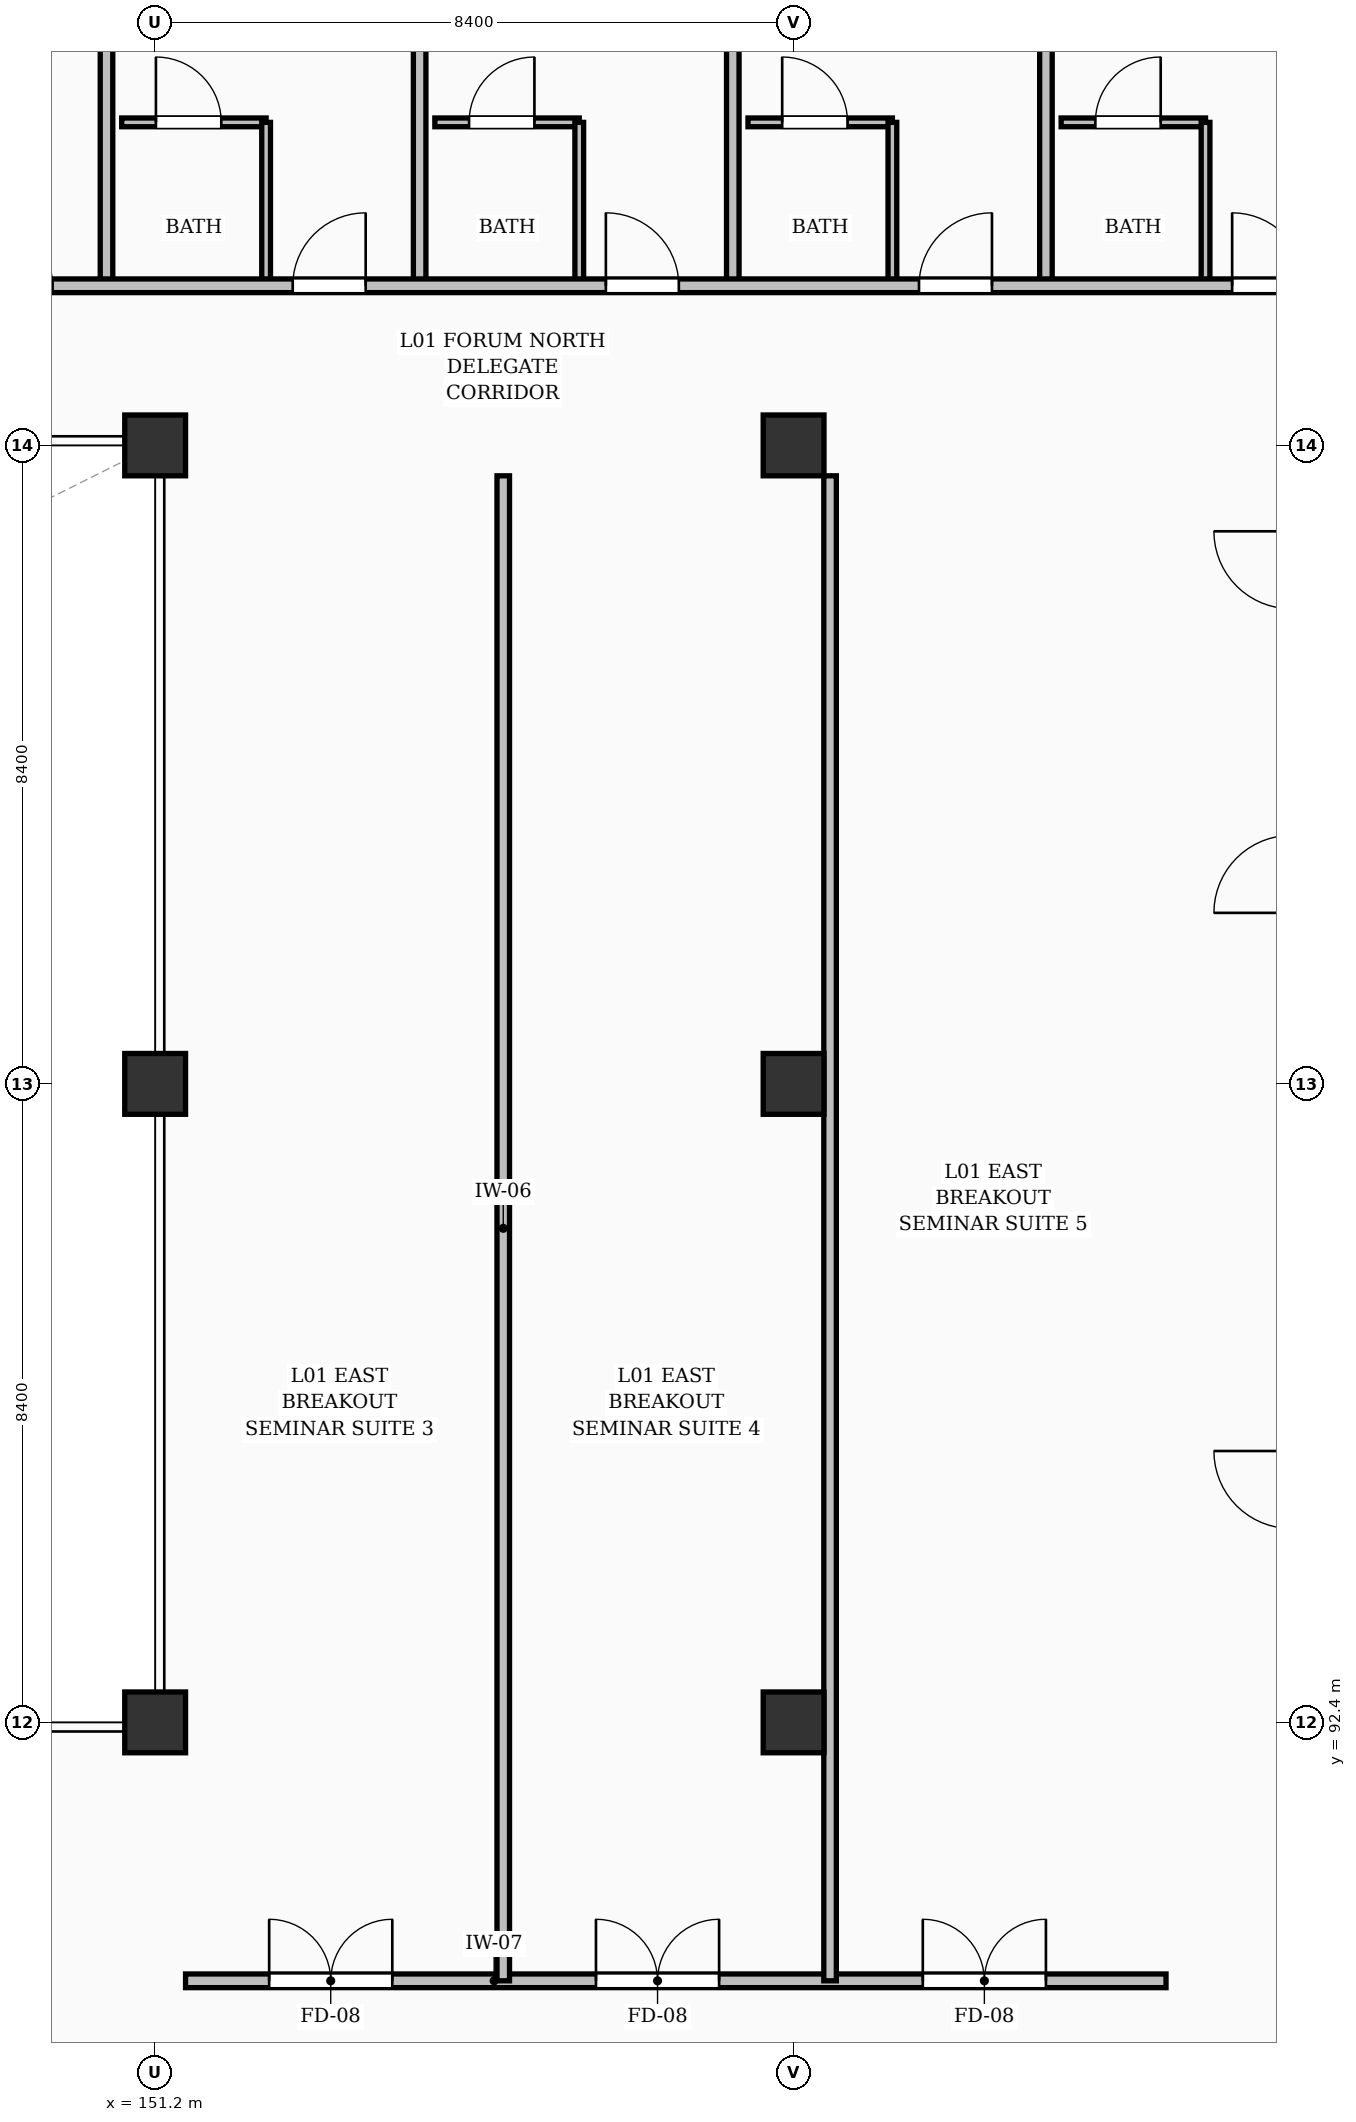
"""IFC4 building model, lengths in metres.
Left out: names, types, materials, properties, quantities, classifications, styles, units other than length and angle.
Written with IfcOpenShell. Run it as: python <this file> out.ifc"""

import sys

from ifc_helpers import new_model, si_unit, direction, frame, frame_2d, origin, origin_2d, place, context, subcontext, project, spatial, rectangle, extrude, element, fill, save


model = new_model("IFC4")
c1 = context("Model", 3, precision=1e-05, world=origin(), true_north=direction((0.0, 1.0)))
c2 = subcontext(c1, "Body", "Model", "MODEL_VIEW")
j1 = project(units=[si_unit("LENGTHUNIT", "METRE"), si_unit("PLANEANGLEUNIT", "RADIAN")], contexts=[c1])
p1 = place(None, origin())
s1 = spatial("IfcSite", under=j1, at=p1, CompositionType="ELEMENT")
p2 = place(p1, origin())
s2 = spatial("IfcBuilding", under=s1, at=p2, CompositionType="ELEMENT")
p3 = place(p2, frame((0.0, 0.0, 3.92)))
s3 = spatial("IfcBuildingStorey", under=s2, at=p3, CompositionType="ELEMENT", Elevation=3.92)
for number, where, z_axis, x_axis in (
    (1, (151.2, 92.4, 0.0), (0.0, 0.0, 1.0), (1.0, 0.0, 0.0)),
    (2, (151.2, 100.8, 0.0), (0.0, 0.0, 1.0), (1.0, 0.0, 0.0)),
    (3, (151.2, 109.2, 0.0), (0.0, 0.0, 1.0), (1.0, 0.0, 0.0)),
    (4, (159.6, 92.4, 0.0), (0.0, 0.0, 1.0), (1.0, 0.0, 0.0)),
    (5, (159.6, 100.8, 0.0), (0.0, 0.0, 1.0), (1.0, 0.0, 0.0)),
    (6, (159.6, 109.2, 0.0), (0.0, 0.0, 1.0), (1.0, 0.0, 0.0)),
):
    element("IfcColumn", number, at=place(p3, frame(where, z_axis=z_axis, x_axis=x_axis)), inside=s3, PredefinedType="COLUMN", context=c2, shape_type="SweptSolid", body=[
        extrude(rectangle(XDim=0.8, YDim=0.8, at=origin_2d()), origin(), (0.0, 0.0, 1.0), 3.64),
    ])
p4 = place(p3, frame((151.6, 89.0, 0.0), z_axis=(0.0, 0.0, 1.0), x_axis=(1.0, 0.0, 0.0)))
e7 = element("IfcWall", 7, at=p4, inside=s3, PredefinedType="PARTITIONING", context=c2, shape_type="SweptSolid", body=[
    extrude(rectangle(XDim=12.9, YDim=0.18, at=frame_2d((6.45, 0.0))), origin(), (0.0, 0.0, 1.0), 3.36),
])
p5 = place(p4, frame((1.1, 0.0, 0.0)))
e8 = element("IfcOpeningElement", 8, at=p5, cuts=e7, PredefinedType="OPENING", context=c2, shape_type="SweptSolid", body=[
    extrude(rectangle(XDim=1.62, YDim=2.2, at=frame_2d((0.81, 1.1))), frame((0.0, 0.1, 0.0), z_axis=(0.0, -1.0, 0.0), x_axis=(1.0, 0.0, 0.0)), (0.0, 0.0, 1.0), 0.2),
])
p6 = place(p4, frame((5.4, 0.0, 0.0)))
e9 = element("IfcOpeningElement", 9, at=p6, cuts=e7, PredefinedType="OPENING", context=c2, shape_type="SweptSolid", body=[
    extrude(rectangle(XDim=1.62, YDim=2.2, at=frame_2d((0.81, 1.1))), frame((0.0, 0.1, 0.0), z_axis=(0.0, -1.0, 0.0), x_axis=(1.0, 0.0, 0.0)), (0.0, 0.0, 1.0), 0.2),
])
p7 = place(p4, frame((9.7, 0.0, 0.0)))
e10 = element("IfcOpeningElement", 10, at=p7, cuts=e7, PredefinedType="OPENING", context=c2, shape_type="SweptSolid", body=[
    extrude(rectangle(XDim=1.62, YDim=2.2, at=frame_2d((0.81, 1.1))), frame((0.0, 0.1, 0.0), z_axis=(0.0, -1.0, 0.0), x_axis=(1.0, 0.0, 0.0)), (0.0, 0.0, 1.0), 0.2),
])
for number, where, z_axis, x_axis in (
    (11, (155.78, 89.0, 0.0), (0.0, 0.0, 1.0), (0.0, 1.0, 0.0)),
    (12, (160.08, 89.0, 0.0), (0.0, 0.0, 1.0), (0.0, 1.0, 0.0)),
):
    element("IfcWall", number, at=place(p3, frame(where, z_axis=z_axis, x_axis=x_axis)), inside=s3, PredefinedType="PARTITIONING", context=c2, shape_type="SweptSolid", body=[
        extrude(rectangle(XDim=19.8, YDim=0.165, at=frame_2d((9.9, 0.0))), origin(), (0.0, 0.0, 1.0), 3.36),
    ])
p8 = place(p3, frame((150.76, 113.45, 0.0), z_axis=(0.0, 0.0, 1.0), x_axis=(1.0, 0.0, 0.0)))
e13 = element("IfcWall", 13, at=p8, inside=s3, PredefinedType="PARTITIONING", context=c2, shape_type="SweptSolid", body=[
    extrude(rectangle(XDim=1.9, YDim=0.115, at=frame_2d((0.95, 0.0))), origin(), (0.0, 0.0, 1.0), 3.36),
])
p9 = place(p8, frame((0.45, 0.0, 0.0)))
e14 = element("IfcOpeningElement", 14, at=p9, cuts=e13, PredefinedType="OPENING", context=c2, shape_type="SweptSolid", body=[
    extrude(rectangle(XDim=0.86, YDim=2.05, at=frame_2d((0.43, 1.025))), frame((0.0, 0.067, 0.0), z_axis=(0.0, -1.0, 0.0), x_axis=(1.0, 0.0, 0.0)), (0.0, 0.0, 1.0), 0.135),
])
p10 = place(p3, frame((152.66, 111.3, 0.0), z_axis=(0.0, 0.0, 1.0), x_axis=(0.0, 1.0, 0.0)))
e15 = element("IfcWall", 15, at=p10, inside=s3, PredefinedType="PARTITIONING", context=c2, shape_type="SweptSolid", body=[
    extrude(rectangle(XDim=2.15, YDim=0.115, at=frame_2d((1.075, 0.0))), origin(), (0.0, 0.0, 1.0), 3.36),
])
p11 = place(p3, frame((150.56, 111.3, 0.0), z_axis=(0.0, 0.0, 1.0), x_axis=(0.0, 1.0, 0.0)))
e16 = element("IfcWall", 16, at=p11, inside=s3, PredefinedType="PARTITIONING", context=c2, shape_type="SweptSolid", body=[
    extrude(rectangle(XDim=6.16, YDim=0.165, at=frame_2d((3.08, 0.0))), origin(), (0.0, 0.0, 1.0), 3.36),
])
p12 = place(p3, frame((154.88, 113.45, 0.0), z_axis=(0.0, 0.0, 1.0), x_axis=(1.0, 0.0, 0.0)))
e17 = element("IfcWall", 17, at=p12, inside=s3, PredefinedType="PARTITIONING", context=c2, shape_type="SweptSolid", body=[
    extrude(rectangle(XDim=1.9, YDim=0.115, at=frame_2d((0.95, 0.0))), origin(), (0.0, 0.0, 1.0), 3.36),
])
p13 = place(p12, frame((0.45, 0.0, 0.0)))
e18 = element("IfcOpeningElement", 18, at=p13, cuts=e17, PredefinedType="OPENING", context=c2, shape_type="SweptSolid", body=[
    extrude(rectangle(XDim=0.86, YDim=2.05, at=frame_2d((0.43, 1.025))), frame((0.0, 0.067, 0.0), z_axis=(0.0, -1.0, 0.0), x_axis=(1.0, 0.0, 0.0)), (0.0, 0.0, 1.0), 0.135),
])
p14 = place(p3, frame((156.78, 111.3, 0.0), z_axis=(0.0, 0.0, 1.0), x_axis=(0.0, 1.0, 0.0)))
e19 = element("IfcWall", 19, at=p14, inside=s3, PredefinedType="PARTITIONING", context=c2, shape_type="SweptSolid", body=[
    extrude(rectangle(XDim=2.15, YDim=0.115, at=frame_2d((1.075, 0.0))), origin(), (0.0, 0.0, 1.0), 3.042),
])
p15 = place(p3, frame((154.68, 111.3, 0.0), z_axis=(0.0, 0.0, 1.0), x_axis=(0.0, 1.0, 0.0)))
e20 = element("IfcWall", 20, at=p15, inside=s3, PredefinedType="PARTITIONING", context=c2, shape_type="SweptSolid", body=[
    extrude(rectangle(XDim=6.15, YDim=0.165, at=frame_2d((3.075, 0.0))), origin(), (0.0, 0.0, 1.0), 3.36),
])
p16 = place(p3, frame((159.0, 113.45, 0.0), z_axis=(0.0, 0.0, 1.0), x_axis=(1.0, 0.0, 0.0)))
e21 = element("IfcWall", 21, at=p16, inside=s3, PredefinedType="PARTITIONING", context=c2, shape_type="SweptSolid", body=[
    extrude(rectangle(XDim=1.9, YDim=0.115, at=frame_2d((0.95, 0.0))), origin(), (0.0, 0.0, 1.0), 3.36),
])
p17 = place(p16, frame((0.45, 0.0, 0.0)))
e22 = element("IfcOpeningElement", 22, at=p17, cuts=e21, PredefinedType="OPENING", context=c2, shape_type="SweptSolid", body=[
    extrude(rectangle(XDim=0.86, YDim=2.05, at=frame_2d((0.43, 1.025))), frame((0.0, 0.067, 0.0), z_axis=(0.0, -1.0, 0.0), x_axis=(1.0, 0.0, 0.0)), (0.0, 0.0, 1.0), 0.135),
])
p18 = place(p3, frame((160.9, 111.3, 0.0), z_axis=(0.0, 0.0, 1.0), x_axis=(0.0, 1.0, 0.0)))
e23 = element("IfcWall", 23, at=p18, inside=s3, PredefinedType="PARTITIONING", context=c2, shape_type="SweptSolid", body=[
    extrude(rectangle(XDim=2.15, YDim=0.115, at=frame_2d((1.075, 0.0))), origin(), (0.0, 0.0, 1.0), 3.36),
])
p19 = place(p3, frame((158.8, 111.3, 0.0), z_axis=(0.0, 0.0, 1.0), x_axis=(0.0, 1.0, 0.0)))
e24 = element("IfcWall", 24, at=p19, inside=s3, PredefinedType="PARTITIONING", context=c2, shape_type="SweptSolid", body=[
    extrude(rectangle(XDim=6.15, YDim=0.165, at=frame_2d((3.075, 0.0))), origin(), (0.0, 0.0, 1.0), 3.36),
])
p20 = place(p3, frame((163.12, 113.45, 0.0), z_axis=(0.0, 0.0, 1.0), x_axis=(1.0, 0.0, 0.0)))
e25 = element("IfcWall", 25, at=p20, inside=s3, PredefinedType="PARTITIONING", context=c2, shape_type="SweptSolid", body=[
    extrude(rectangle(XDim=1.9, YDim=0.115, at=frame_2d((0.95, 0.0))), origin(), (0.0, 0.0, 1.0), 3.36),
])
p21 = place(p20, frame((0.45, 0.0, 0.0)))
e26 = element("IfcOpeningElement", 26, at=p21, cuts=e25, PredefinedType="OPENING", context=c2, shape_type="SweptSolid", body=[
    extrude(rectangle(XDim=0.86, YDim=2.05, at=frame_2d((0.43, 1.025))), frame((0.0, 0.067, 0.0), z_axis=(0.0, -1.0, 0.0), x_axis=(1.0, 0.0, 0.0)), (0.0, 0.0, 1.0), 0.135),
])
p22 = place(p3, frame((165.02, 111.3, 0.0), z_axis=(0.0, 0.0, 1.0), x_axis=(0.0, 1.0, 0.0)))
e27 = element("IfcWall", 27, at=p22, inside=s3, PredefinedType="PARTITIONING", context=c2, shape_type="SweptSolid", body=[
    extrude(rectangle(XDim=2.15, YDim=0.115, at=frame_2d((1.075, 0.0))), origin(), (0.0, 0.0, 1.0), 3.36),
])
p23 = place(p3, frame((162.92, 111.3, 0.0), z_axis=(0.0, 0.0, 1.0), x_axis=(0.0, 1.0, 0.0)))
e28 = element("IfcWall", 28, at=p23, inside=s3, PredefinedType="PARTITIONING", context=c2, shape_type="SweptSolid", body=[
    extrude(rectangle(XDim=6.137, YDim=0.165, at=frame_2d((3.069, 0.0))), origin(), (0.0, 0.0, 1.0), 3.36),
])
p24 = place(p3, frame((117.6, 111.3, 0.0), z_axis=(0.0, 0.0, 1.0), x_axis=(1.0, 0.0, 0.0)))
e29 = element("IfcWall", 29, at=p24, inside=s3, PredefinedType="PARTITIONING", context=c2, shape_type="SweptSolid", body=[
    extrude(rectangle(XDim=50.32, YDim=0.18, at=frame_2d((25.16, 0.0))), origin(), (0.0, 0.0, 1.0), 3.36),
])
p25 = place(p24, frame((2.45, 0.0, 0.0)))
e30 = element("IfcOpeningElement", 30, at=p25, cuts=e29, PredefinedType="OPENING", context=c2, shape_type="SweptSolid", body=[
    extrude(rectangle(XDim=0.96, YDim=2.15, at=frame_2d((0.48, 1.075))), frame((0.0, 0.1, 0.0), z_axis=(0.0, -1.0, 0.0), x_axis=(1.0, 0.0, 0.0)), (0.0, 0.0, 1.0), 0.2),
])
p26 = place(p24, frame((6.57, 0.0, 0.0)))
e31 = element("IfcOpeningElement", 31, at=p26, cuts=e29, PredefinedType="OPENING", context=c2, shape_type="SweptSolid", body=[
    extrude(rectangle(XDim=0.96, YDim=2.15, at=frame_2d((0.48, 1.075))), frame((0.0, 0.1, 0.0), z_axis=(0.0, -1.0, 0.0), x_axis=(1.0, 0.0, 0.0)), (0.0, 0.0, 1.0), 0.2),
])
p27 = place(p24, frame((10.69, 0.0, 0.0)))
e32 = element("IfcOpeningElement", 32, at=p27, cuts=e29, PredefinedType="OPENING", context=c2, shape_type="SweptSolid", body=[
    extrude(rectangle(XDim=0.96, YDim=2.15, at=frame_2d((0.48, 1.075))), frame((0.0, 0.1, 0.0), z_axis=(0.0, -1.0, 0.0), x_axis=(1.0, 0.0, 0.0)), (0.0, 0.0, 1.0), 0.2),
])
p28 = place(p24, frame((14.81, 0.0, 0.0)))
e33 = element("IfcOpeningElement", 33, at=p28, cuts=e29, PredefinedType="OPENING", context=c2, shape_type="SweptSolid", body=[
    extrude(rectangle(XDim=0.96, YDim=2.15, at=frame_2d((0.48, 1.075))), frame((0.0, 0.1, 0.0), z_axis=(0.0, -1.0, 0.0), x_axis=(1.0, 0.0, 0.0)), (0.0, 0.0, 1.0), 0.2),
])
p29 = place(p24, frame((18.93, 0.0, 0.0)))
e34 = element("IfcOpeningElement", 34, at=p29, cuts=e29, PredefinedType="OPENING", context=c2, shape_type="SweptSolid", body=[
    extrude(rectangle(XDim=0.96, YDim=2.15, at=frame_2d((0.48, 1.075))), frame((0.0, 0.1, 0.0), z_axis=(0.0, -1.0, 0.0), x_axis=(1.0, 0.0, 0.0)), (0.0, 0.0, 1.0), 0.2),
])
p30 = place(p24, frame((23.05, 0.0, 0.0)))
e35 = element("IfcOpeningElement", 35, at=p30, cuts=e29, PredefinedType="OPENING", context=c2, shape_type="SweptSolid", body=[
    extrude(rectangle(XDim=0.96, YDim=2.15, at=frame_2d((0.48, 1.075))), frame((0.0, 0.1, 0.0), z_axis=(0.0, -1.0, 0.0), x_axis=(1.0, 0.0, 0.0)), (0.0, 0.0, 1.0), 0.2),
])
p31 = place(p24, frame((27.17, 0.0, 0.0)))
e36 = element("IfcOpeningElement", 36, at=p31, cuts=e29, PredefinedType="OPENING", context=c2, shape_type="SweptSolid", body=[
    extrude(rectangle(XDim=0.96, YDim=2.15, at=frame_2d((0.48, 1.075))), frame((0.0, 0.1, 0.0), z_axis=(0.0, -1.0, 0.0), x_axis=(1.0, 0.0, 0.0)), (0.0, 0.0, 1.0), 0.2),
])
p32 = place(p24, frame((31.29, 0.0, 0.0)))
e37 = element("IfcOpeningElement", 37, at=p32, cuts=e29, PredefinedType="OPENING", context=c2, shape_type="SweptSolid", body=[
    extrude(rectangle(XDim=0.96, YDim=2.15, at=frame_2d((0.48, 1.075))), frame((0.0, 0.1, 0.0), z_axis=(0.0, -1.0, 0.0), x_axis=(1.0, 0.0, 0.0)), (0.0, 0.0, 1.0), 0.2),
])
p33 = place(p24, frame((35.41, 0.0, 0.0)))
e38 = element("IfcOpeningElement", 38, at=p33, cuts=e29, PredefinedType="OPENING", context=c2, shape_type="SweptSolid", body=[
    extrude(rectangle(XDim=0.96, YDim=2.15, at=frame_2d((0.48, 1.075))), frame((0.0, 0.1, 0.0), z_axis=(0.0, -1.0, 0.0), x_axis=(1.0, 0.0, 0.0)), (0.0, 0.0, 1.0), 0.2),
])
p34 = place(p24, frame((39.53, 0.0, 0.0)))
e39 = element("IfcOpeningElement", 39, at=p34, cuts=e29, PredefinedType="OPENING", context=c2, shape_type="SweptSolid", body=[
    extrude(rectangle(XDim=0.96, YDim=2.15, at=frame_2d((0.48, 1.075))), frame((0.0, 0.1, 0.0), z_axis=(0.0, -1.0, 0.0), x_axis=(1.0, 0.0, 0.0)), (0.0, 0.0, 1.0), 0.2),
])
p35 = place(p24, frame((43.65, 0.0, 0.0)))
e40 = element("IfcOpeningElement", 40, at=p35, cuts=e29, PredefinedType="OPENING", context=c2, shape_type="SweptSolid", body=[
    extrude(rectangle(XDim=0.96, YDim=2.15, at=frame_2d((0.48, 1.075))), frame((0.0, 0.1, 0.0), z_axis=(0.0, -1.0, 0.0), x_axis=(1.0, 0.0, 0.0)), (0.0, 0.0, 1.0), 0.2),
])
p36 = place(p24, frame((47.77, 0.0, 0.0)))
e41 = element("IfcOpeningElement", 41, at=p36, cuts=e29, PredefinedType="OPENING", context=c2, shape_type="SweptSolid", body=[
    extrude(rectangle(XDim=0.96, YDim=2.15, at=frame_2d((0.48, 1.075))), frame((0.0, 0.1, 0.0), z_axis=(0.0, -1.0, 0.0), x_axis=(1.0, 0.0, 0.0)), (0.0, 0.0, 1.0), 0.2),
])
p37 = place(p5, origin())
e42 = element("IfcDoor", 42, at=p37, inside=s3, OperationType="DOUBLE_DOOR_SINGLE_SWING", PredefinedType="DOOR", context=c2, shape_type="SweptSolid", body=[
    extrude(rectangle(XDim=1.62, YDim=2.2, at=frame_2d((0.81, 1.1))), frame((0.0, 0.025, 0.0), z_axis=(0.0, -1.0, 0.0), x_axis=(1.0, 0.0, 0.0)), (0.0, 0.0, 1.0), 0.05),
])
fill(e8, e42)
p38 = place(p6, origin())
e43 = element("IfcDoor", 43, at=p38, inside=s3, OperationType="DOUBLE_DOOR_SINGLE_SWING", PredefinedType="DOOR", context=c2, shape_type="SweptSolid", body=[
    extrude(rectangle(XDim=1.62, YDim=2.2, at=frame_2d((0.81, 1.1))), frame((0.0, 0.025, 0.0), z_axis=(0.0, -1.0, 0.0), x_axis=(1.0, 0.0, 0.0)), (0.0, 0.0, 1.0), 0.05),
])
fill(e9, e43)
p39 = place(p7, origin())
e44 = element("IfcDoor", 44, at=p39, inside=s3, OperationType="DOUBLE_DOOR_SINGLE_SWING", PredefinedType="DOOR", context=c2, shape_type="SweptSolid", body=[
    extrude(rectangle(XDim=1.62, YDim=2.2, at=frame_2d((0.81, 1.1))), frame((0.0, 0.025, 0.0), z_axis=(0.0, -1.0, 0.0), x_axis=(1.0, 0.0, 0.0)), (0.0, 0.0, 1.0), 0.05),
])
fill(e10, e44)
p40 = place(p9, origin())
e45 = element("IfcDoor", 45, at=p40, inside=s3, OperationType="SINGLE_SWING_LEFT", PredefinedType="DOOR", context=c2, shape_type="SweptSolid", body=[
    extrude(rectangle(XDim=0.86, YDim=2.05, at=frame_2d((0.43, 1.025))), frame((0.0, 0.025, 0.0), z_axis=(0.0, -1.0, 0.0), x_axis=(1.0, 0.0, 0.0)), (0.0, 0.0, 1.0), 0.05),
])
fill(e14, e45)
p41 = place(p13, origin())
e46 = element("IfcDoor", 46, at=p41, inside=s3, OperationType="SINGLE_SWING_RIGHT", PredefinedType="DOOR", context=c2, shape_type="SweptSolid", body=[
    extrude(rectangle(XDim=0.86, YDim=2.05, at=frame_2d((0.43, 1.025))), frame((0.0, 0.025, 0.0), z_axis=(0.0, -1.0, 0.0), x_axis=(1.0, 0.0, 0.0)), (0.0, 0.0, 1.0), 0.05),
])
fill(e18, e46)
p42 = place(p17, origin())
e47 = element("IfcDoor", 47, at=p42, inside=s3, OperationType="SINGLE_SWING_LEFT", PredefinedType="DOOR", context=c2, shape_type="SweptSolid", body=[
    extrude(rectangle(XDim=0.86, YDim=2.05, at=frame_2d((0.43, 1.025))), frame((0.0, 0.025, 0.0), z_axis=(0.0, -1.0, 0.0), x_axis=(1.0, 0.0, 0.0)), (0.0, 0.0, 1.0), 0.05),
])
fill(e22, e47)
p43 = place(p21, origin())
e48 = element("IfcDoor", 48, at=p43, inside=s3, OperationType="SINGLE_SWING_RIGHT", PredefinedType="DOOR", context=c2, shape_type="SweptSolid", body=[
    extrude(rectangle(XDim=0.86, YDim=2.05, at=frame_2d((0.43, 1.025))), frame((0.0, 0.025, 0.0), z_axis=(0.0, -1.0, 0.0), x_axis=(1.0, 0.0, 0.0)), (0.0, 0.0, 1.0), 0.05),
])
fill(e26, e48)
p44 = place(p32, origin())
e49 = element("IfcDoor", 49, at=p44, inside=s3, OperationType="SINGLE_SWING_LEFT", PredefinedType="DOOR", context=c2, shape_type="SweptSolid", body=[
    extrude(rectangle(XDim=0.96, YDim=2.15, at=frame_2d((0.48, 1.075))), frame((0.0, 0.025, 0.0), z_axis=(0.0, -1.0, 0.0), x_axis=(1.0, 0.0, 0.0)), (0.0, 0.0, 1.0), 0.05),
])
fill(e37, e49)
p45 = place(p33, origin())
e50 = element("IfcDoor", 50, at=p45, inside=s3, OperationType="SINGLE_SWING_RIGHT", PredefinedType="DOOR", context=c2, shape_type="SweptSolid", body=[
    extrude(rectangle(XDim=0.96, YDim=2.15, at=frame_2d((0.48, 1.075))), frame((0.0, 0.025, 0.0), z_axis=(0.0, -1.0, 0.0), x_axis=(1.0, 0.0, 0.0)), (0.0, 0.0, 1.0), 0.05),
])
fill(e38, e50)
p46 = place(p34, origin())
e51 = element("IfcDoor", 51, at=p46, inside=s3, OperationType="SINGLE_SWING_LEFT", PredefinedType="DOOR", context=c2, shape_type="SweptSolid", body=[
    extrude(rectangle(XDim=0.96, YDim=2.15, at=frame_2d((0.48, 1.075))), frame((0.0, 0.025, 0.0), z_axis=(0.0, -1.0, 0.0), x_axis=(1.0, 0.0, 0.0)), (0.0, 0.0, 1.0), 0.05),
])
fill(e39, e51)
p47 = place(p35, origin())
e52 = element("IfcDoor", 52, at=p47, inside=s3, OperationType="SINGLE_SWING_RIGHT", PredefinedType="DOOR", context=c2, shape_type="SweptSolid", body=[
    extrude(rectangle(XDim=0.96, YDim=2.15, at=frame_2d((0.48, 1.075))), frame((0.0, 0.025, 0.0), z_axis=(0.0, -1.0, 0.0), x_axis=(1.0, 0.0, 0.0)), (0.0, 0.0, 1.0), 0.05),
])
fill(e40, e52)
p48 = place(p36, origin())
e53 = element("IfcDoor", 53, at=p48, inside=s3, OperationType="SINGLE_SWING_LEFT", PredefinedType="DOOR", context=c2, shape_type="SweptSolid", body=[
    extrude(rectangle(XDim=0.96, YDim=2.15, at=frame_2d((0.48, 1.075))), frame((0.0, 0.025, 0.0), z_axis=(0.0, -1.0, 0.0), x_axis=(1.0, 0.0, 0.0)), (0.0, 0.0, 1.0), 0.05),
])
fill(e41, e53)
save(model, sys.argv[1])
